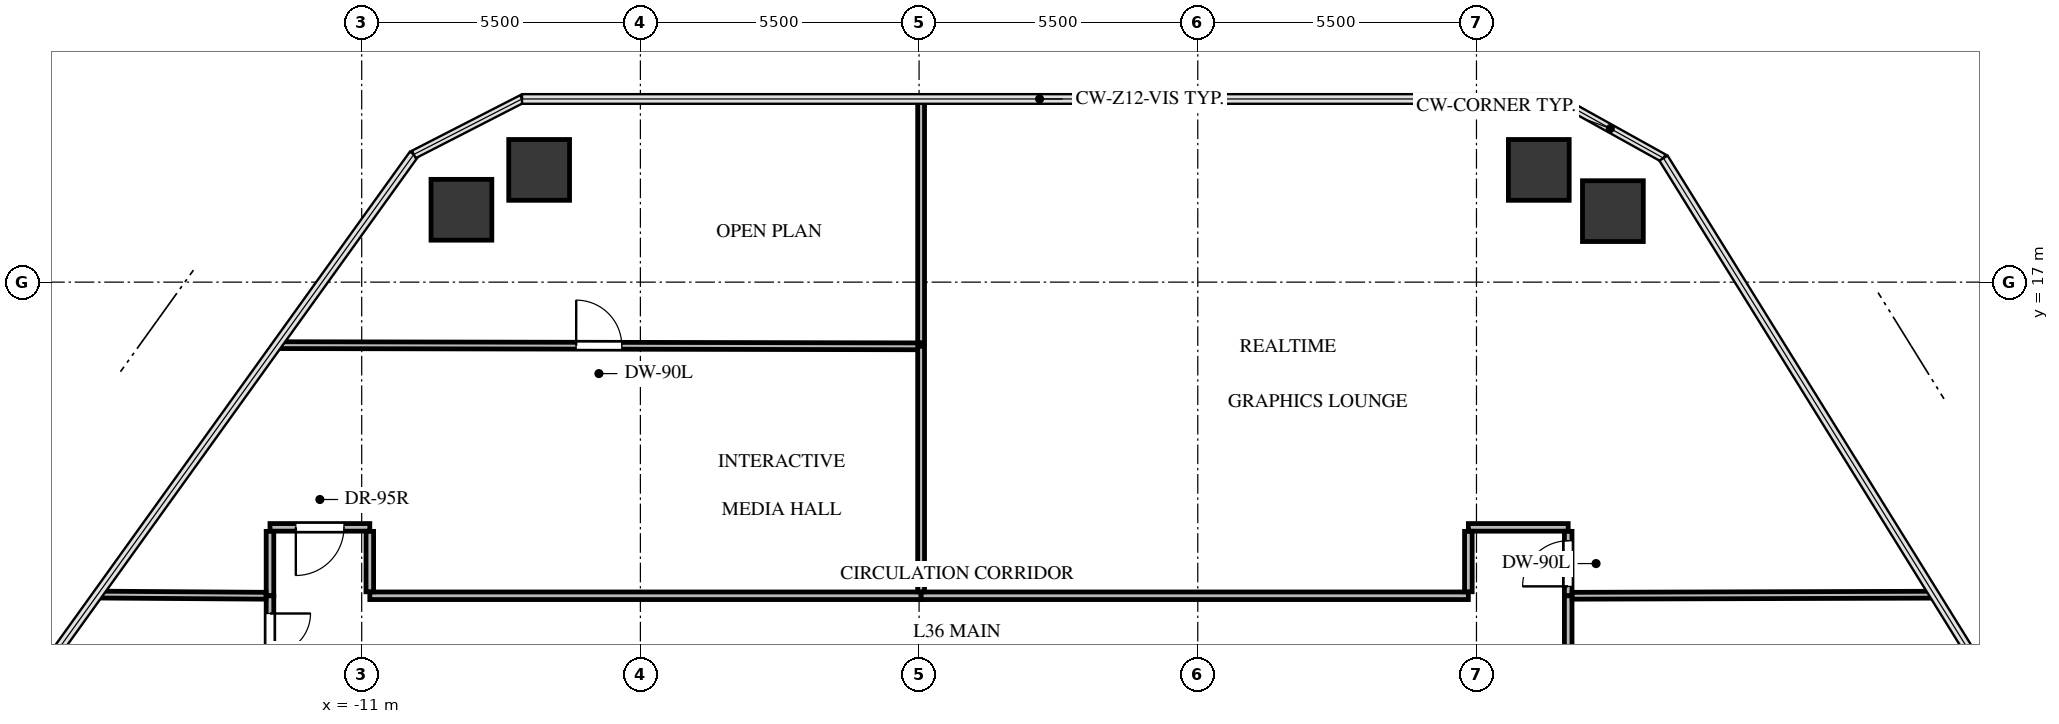
"""IFC4 building model, lengths in metres.
Left out: names, types, materials, properties, quantities, classifications, styles, units other than length and angle.
Written with IfcOpenShell. Run it as: python <this file> out.ifc"""

import sys

from ifc_helpers import new_model, si_unit, direction, frame, frame_2d, origin, origin_2d, place, context, subcontext, project, spatial, rectangle, extrude, source, transform, mapped, element, fill, save


model = new_model("IFC4")
c1 = context("Model", 3, precision=1e-05, world=origin(), true_north=direction((0.0, 1.0)))
c2 = subcontext(c1, "Body", "Model", "MODEL_VIEW")
j1 = project(units=[si_unit("LENGTHUNIT", "METRE"), si_unit("PLANEANGLEUNIT", "RADIAN")], contexts=[c1])
p1 = place(None, origin())
s1 = spatial("IfcSite", under=j1, at=p1, CompositionType="ELEMENT")
p2 = place(p1, origin())
s2 = spatial("IfcBuilding", under=s1, at=p2, CompositionType="ELEMENT")
p3 = place(p2, frame((0.0, 0.0, 133.8)))
s3 = spatial("IfcBuildingStorey", under=s2, at=p3, CompositionType="ELEMENT", Elevation=133.8)
m1 = source(origin(), c2, "Body", "SweptSolid", [
    extrude(rectangle(XDim=1.2, YDim=1.2, at=origin_2d()), origin(), (0.0, 0.0, 1.0), 3.3),
])
for number, where, z_axis, x_axis in (
    (1, (-9.032, 18.428, -0.24), (0.0, 0.0, 1.0), (1.0, 0.0, 0.0)),
    (2, (-7.498, 19.215, -0.24), (0.0, 0.0, 1.0), (1.0, 0.0, 0.0)),
    (3, (12.23, 19.215, -0.24), (0.0, 0.0, 1.0), (1.0, 0.0, 0.0)),
    (4, (13.692, 18.401, -0.24), (0.0, 0.0, 1.0), (1.0, 0.0, 0.0)),
):
    element("IfcColumn", number, at=place(p3, frame(where, z_axis=z_axis, x_axis=x_axis)), inside=s3, PredefinedType="COLUMN", context=c2, shape_type="MappedRepresentation", body=[
        mapped(m1, transform((0.0, 0.0, 0.0), x_axis=(1.0, 0.0, 0.0), y_axis=(0.0, 1.0, 0.0), z_axis=(0.0, 0.0, 1.0), scale=1.0)),
    ])
p4 = place(p3, frame((0.04, 10.81, 0.0), z_axis=(0.0, 0.0, 1.0), x_axis=(-1.0, 0.0, 0.0)))
e5 = element("IfcWall", 5, at=p4, inside=s3, PredefinedType="PARTITIONING", context=c2, shape_type="SweptSolid", body=[
    extrude(rectangle(XDim=10.88, YDim=0.15, at=frame_2d((5.44, 0.0))), origin(), (0.0, 0.0, 1.0), 2.212),
])
p5 = place(p3, frame((-10.84, 12.16, 0.0), z_axis=(0.0, 0.0, 1.0), x_axis=(-1.0, 0.0, 0.0)))
e6 = element("IfcWall", 6, at=p5, inside=s3, PredefinedType="PARTITIONING", context=c2, shape_type="SweptSolid", body=[
    extrude(rectangle(XDim=1.97, YDim=0.15, at=frame_2d((0.985, 0.0))), origin(), (0.0, 0.0, 1.0), 3.045),
])
p6 = place(p5, frame((0.51, 0.0, 0.0)))
e7 = element("IfcOpeningElement", 7, at=p6, cuts=e6, PredefinedType="OPENING", context=c2, shape_type="SweptSolid", body=[
    extrude(rectangle(XDim=0.95, YDim=2.1, at=frame_2d((0.475, 1.05))), frame((0.0, 0.085, 0.0), z_axis=(0.0, -1.0, 0.0), x_axis=(1.0, 0.0, 0.0)), (0.0, 0.0, 1.0), 0.17),
])
p7 = place(p3, frame((-10.84, 10.889, 0.0), z_axis=(0.0, 0.0, 1.0), x_axis=(0.0, 1.0, 0.0)))
e8 = element("IfcWall", 8, at=p7, inside=s3, PredefinedType="PARTITIONING", context=c2, shape_type="SweptSolid", body=[
    extrude(rectangle(XDim=1.192, YDim=0.15, at=frame_2d((0.596, 0.0))), origin(), (0.0, 0.0, 1.0), 3.045),
])
p8 = place(p3, frame((-12.81, 12.081, 0.0), z_axis=(0.0, 0.0, 1.0), x_axis=(0.0, -1.0, 0.0)))
e9 = element("IfcWall", 9, at=p8, inside=s3, PredefinedType="PARTITIONING", context=c2, shape_type="SweptSolid", body=[
    extrude(rectangle(XDim=1.271, YDim=0.15, at=frame_2d((0.635, 0.0))), origin(), (0.0, 0.0, 1.0), 3.045),
])
p9 = place(p3, frame((10.84, 10.81, 0.0), z_axis=(0.0, 0.0, 1.0), x_axis=(-1.0, 0.0, 0.0)))
e10 = element("IfcWall", 10, at=p9, inside=s3, PredefinedType="PARTITIONING", context=c2, shape_type="SweptSolid", body=[
    extrude(rectangle(XDim=10.8, YDim=0.15, at=frame_2d((5.4, 0.0))), origin(), (0.0, 0.0, 1.0), 2.212),
])
p10 = place(p3, frame((12.81, 12.16, 0.0), z_axis=(0.0, 0.0, 1.0), x_axis=(-1.0, 0.0, 0.0)))
e11 = element("IfcWall", 11, at=p10, inside=s3, PredefinedType="PARTITIONING", context=c2, shape_type="SweptSolid", body=[
    extrude(rectangle(XDim=1.97, YDim=0.15, at=frame_2d((0.985, 0.0))), origin(), (0.0, 0.0, 1.0), 2.212),
])
p11 = place(p3, frame((12.81, 10.81, 0.0), z_axis=(0.0, 0.0, 1.0), x_axis=(0.0, 1.0, 0.0)))
e12 = element("IfcWall", 12, at=p11, inside=s3, PredefinedType="PARTITIONING", context=c2, shape_type="SweptSolid", body=[
    extrude(rectangle(XDim=1.271, YDim=0.15, at=frame_2d((0.635, 0.0))), origin(), (0.0, 0.0, 1.0), 3.045),
])
p12 = place(p11, frame((0.186, 0.0, 0.0)))
e13 = element("IfcOpeningElement", 13, at=p12, cuts=e12, PredefinedType="OPENING", context=c2, shape_type="SweptSolid", body=[
    extrude(rectangle(XDim=0.9, YDim=2.05, at=frame_2d((0.45, 1.025))), frame((0.0, 0.085, 0.0), z_axis=(0.0, -1.0, 0.0), x_axis=(1.0, 0.0, 0.0)), (0.0, 0.0, 1.0), 0.17),
])
p13 = place(p3, frame((10.84, 12.081, 0.0), z_axis=(0.0, 0.0, 1.0), x_axis=(0.0, -1.0, 0.0)))
e14 = element("IfcWall", 14, at=p13, inside=s3, PredefinedType="PARTITIONING", context=c2, shape_type="SweptSolid", body=[
    extrude(rectangle(XDim=1.192, YDim=0.15, at=frame_2d((0.596, 0.0))), origin(), (0.0, 0.0, 1.0), 2.212),
])
p14 = place(p3, frame((-12.81, 10.81, 0.0), z_axis=(0.0, 0.0, 1.0), x_axis=(0.0, -1.0, 0.0)))
e15 = element("IfcWall", 15, at=p14, inside=s3, PredefinedType="PARTITIONING", context=c2, shape_type="SweptSolid", body=[
    extrude(rectangle(XDim=6.27, YDim=0.15, at=frame_2d((3.135, 0.0))), origin(), (0.0, 0.0, 1.0), 3.045),
])
p15 = place(p14, frame((0.35, 0.0, 0.0)))
e16 = element("IfcOpeningElement", 16, at=p15, cuts=e15, PredefinedType="OPENING", context=c2, shape_type="SweptSolid", body=[
    extrude(rectangle(XDim=1.6, YDim=2.15, at=frame_2d((0.8, 1.075))), frame((0.0, 0.085, 0.0), z_axis=(0.0, -1.0, 0.0), x_axis=(1.0, 0.0, 0.0)), (0.0, 0.0, 1.0), 0.17),
])
p16 = place(p3, frame((12.81, 5.54, 0.0), z_axis=(0.0, 0.0, 1.0), x_axis=(0.0, 1.0, 0.0)))
e17 = element("IfcWall", 17, at=p16, inside=s3, PredefinedType="PARTITIONING", context=c2, shape_type="SweptSolid", body=[
    extrude(rectangle(XDim=5.27, YDim=0.15, at=frame_2d((2.635, 0.0))), origin(), (0.0, 0.0, 1.0), 3.045),
])
p17 = place(p16, frame((2.16, 0.0, 0.0)))
e18 = element("IfcOpeningElement", 18, at=p17, cuts=e17, PredefinedType="OPENING", context=c2, shape_type="SweptSolid", body=[
    extrude(rectangle(XDim=0.95, YDim=2.1, at=frame_2d((0.475, 1.05))), frame((0.0, 0.085, 0.0), z_axis=(0.0, -1.0, 0.0), x_axis=(1.0, 0.0, 0.0)), (0.0, 0.0, 1.0), 0.17),
])
p18 = place(p3, frame((-12.675, 15.756, 0.0), z_axis=(0.0, 0.0, 1.0), x_axis=(0.999998301224, -0.001843244056, 0.0)))
e19 = element("IfcWall", 19, at=p18, inside=s3, PredefinedType="PARTITIONING", context=c2, shape_type="SweptSolid", body=[
    extrude(rectangle(XDim=12.715, YDim=0.135, at=frame_2d((6.358, 0.0))), origin(), (0.0, 0.0, 1.0), 2.212),
])
p19 = place(p18, frame((5.908, 0.0, 0.0)))
e20 = element("IfcOpeningElement", 20, at=p19, cuts=e19, PredefinedType="OPENING", context=c2, shape_type="SweptSolid", body=[
    extrude(rectangle(XDim=0.9, YDim=2.05, at=frame_2d((0.45, 1.025))), frame((0.0, 0.078, 0.0), z_axis=(0.0, -1.0, 0.0), x_axis=(1.0, 0.0, 0.0)), (0.0, 0.0, 1.0), 0.155),
])
p20 = place(p3, frame((0.04, 15.733, 0.0), z_axis=(0.0, 0.0, 1.0), x_axis=(0.0, -1.0, 0.0)))
e21 = element("IfcWall", 21, at=p20, inside=s3, PredefinedType="PARTITIONING", context=c2, shape_type="SweptSolid", body=[
    extrude(rectangle(XDim=4.844, YDim=0.135, at=frame_2d((2.422, 0.0))), origin(), (0.0, 0.0, 1.0), 3.045),
])
p21 = place(p3, frame((-12.889, 10.811, 0.0), z_axis=(0.0, 0.0, 1.0), x_axis=(-0.999976657862, 0.006832549348, 0.0)))
e22 = element("IfcWall", 22, at=p21, inside=s3, PredefinedType="PARTITIONING", context=c2, shape_type="SweptSolid", body=[
    extrude(rectangle(XDim=3.323, YDim=0.135, at=frame_2d((1.662, 0.0))), origin(), (0.0, 0.0, 1.0), 2.38),
])
p22 = place(p3, frame((0.04, 20.615, 0.0), z_axis=(0.0, 0.0, 1.0), x_axis=(0.0, -1.0, 0.0)))
e23 = element("IfcWall", 23, at=p22, inside=s3, PredefinedType="PARTITIONING", context=c2, shape_type="SweptSolid", body=[
    extrude(rectangle(XDim=4.811, YDim=0.135, at=frame_2d((2.405, 0.0))), origin(), (0.0, 0.0, 1.0), 2.38),
])
p23 = place(p3, frame((20.035, 10.831, 0.0), z_axis=(0.0, 0.0, 1.0), x_axis=(-0.999995783715, -0.002903885812, 0.0)))
e24 = element("IfcWall", 24, at=p23, inside=s3, PredefinedType="PARTITIONING", context=c2, shape_type="SweptSolid", body=[
    extrude(rectangle(XDim=7.146, YDim=0.135, at=frame_2d((3.573, 0.0))), origin(), (0.0, 0.0, 1.0), 2.38),
])
m2 = source(origin(), c2, "Body", "SweptSolid", [
    extrude(rectangle(XDim=0.95, YDim=2.1, at=frame_2d((0.475, 1.05))), frame((0.0, 0.025, 0.0), z_axis=(0.0, -1.0, 0.0), x_axis=(1.0, 0.0, 0.0)), (0.0, 0.0, 1.0), 0.05),
])
p24 = place(p6, origin())
e25 = element("IfcDoor", 25, at=p24, inside=s3, OperationType="SINGLE_SWING_RIGHT", PredefinedType="DOOR", context=c2, shape_type="MappedRepresentation", body=[
    mapped(m2, transform((0.0, 0.0, 0.0), x_axis=(1.0, 0.0, 0.0), y_axis=(0.0, 1.0, 0.0), z_axis=(0.0, 0.0, 1.0), scale=1.0)),
])
fill(e7, e25)
m3 = source(origin(), c2, "Body", "SweptSolid", [
    extrude(rectangle(XDim=0.9, YDim=2.05, at=frame_2d((0.45, 1.025))), frame((0.0, 0.025, 0.0), z_axis=(0.0, -1.0, 0.0), x_axis=(1.0, 0.0, 0.0)), (0.0, 0.0, 1.0), 0.05),
])
p25 = place(p12, origin())
e26 = element("IfcDoor", 26, at=p25, inside=s3, OperationType="SINGLE_SWING_LEFT", PredefinedType="DOOR", context=c2, shape_type="MappedRepresentation", body=[
    mapped(m3, transform((0.0, 0.0, 0.0), x_axis=(1.0, 0.0, 0.0), y_axis=(0.0, 1.0, 0.0), z_axis=(0.0, 0.0, 1.0), scale=1.0)),
])
fill(e13, e26)
m4 = source(origin(), c2, "Body", "SweptSolid", [
    extrude(rectangle(XDim=1.6, YDim=2.15, at=frame_2d((0.8, 1.075))), frame((0.0, 0.025, 0.0), z_axis=(0.0, -1.0, 0.0), x_axis=(1.0, 0.0, 0.0)), (0.0, 0.0, 1.0), 0.05),
])
p26 = place(p15, origin())
e27 = element("IfcDoor", 27, at=p26, inside=s3, OperationType="DOUBLE_DOOR_SINGLE_SWING", PredefinedType="DOOR", context=c2, shape_type="MappedRepresentation", body=[
    mapped(m4, transform((0.0, 0.0, 0.0), x_axis=(1.0, 0.0, 0.0), y_axis=(0.0, 1.0, 0.0), z_axis=(0.0, 0.0, 1.0), scale=1.0)),
])
fill(e16, e27)
p27 = place(p19, origin())
e28 = element("IfcDoor", 28, at=p27, inside=s3, OperationType="SINGLE_SWING_LEFT", PredefinedType="DOOR", context=c2, shape_type="MappedRepresentation", body=[
    mapped(m3, transform((0.0, 0.0, 0.0), x_axis=(1.0, 0.0, 0.0), y_axis=(0.0, 1.0, 0.0), z_axis=(0.0, 0.0, 1.0), scale=1.0)),
])
fill(e20, e28)
save(model, sys.argv[1])
